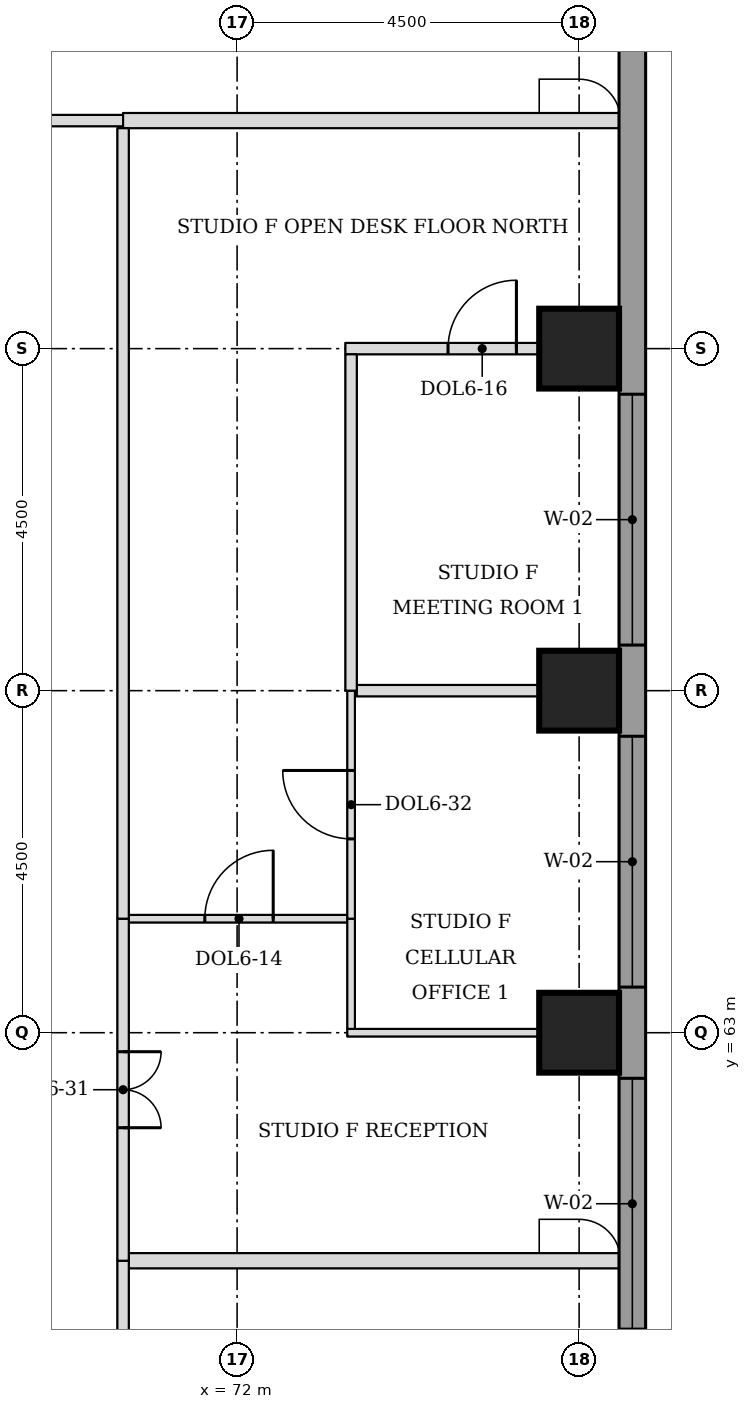
"""IFC4 building model, lengths in metres.
Left out: names, types, materials, properties, quantities, classifications, styles, units other than length and angle.
Written with IfcOpenShell. Run it as: python <this file> out.ifc"""

import sys

from ifc_helpers import new_model, si_unit, direction, frame, frame_2d, origin, origin_2d, place, context, subcontext, project, spatial, rectangle, extrude, element, fill, save


model = new_model("IFC4")
c1 = context("Model", 3, precision=1e-05, world=origin(), true_north=direction((0.0, 1.0)))
c2 = subcontext(c1, "Body", "Model", "MODEL_VIEW")
j1 = project(units=[si_unit("LENGTHUNIT", "METRE"), si_unit("PLANEANGLEUNIT", "RADIAN")], contexts=[c1])
p1 = place(None, origin())
s1 = spatial("IfcSite", under=j1, at=p1, CompositionType="ELEMENT")
p2 = place(p1, origin())
s2 = spatial("IfcBuilding", under=s1, at=p2, CompositionType="ELEMENT")
p3 = place(p2, frame((0.0, 0.0, 115.9)))
s3 = spatial("IfcBuildingStorey", under=s2, at=p3, CompositionType="ELEMENT", Elevation=115.9)
for number, where, z_axis, x_axis in (
    (1, (76.5, 63.0, 0.0), (0.0, 0.0, 1.0), (1.0, 0.0, 0.0)),
    (2, (76.5, 67.5, 0.0), (0.0, 0.0, 1.0), (1.0, 0.0, 0.0)),
    (3, (76.5, 72.0, 0.0), (0.0, 0.0, 1.0), (1.0, 0.0, 0.0)),
):
    element("IfcColumn", number, at=place(p3, frame(where, z_axis=z_axis, x_axis=x_axis)), inside=s3, PredefinedType="COLUMN", context=c2, shape_type="SweptSolid", body=[
        extrude(rectangle(XDim=1.05, YDim=1.05, at=origin_2d()), origin(), (0.0, 0.0, 1.0), 3.7),
    ])
p4 = place(p3, frame((77.2, 44.638, 0.0), z_axis=(0.0, 0.0, 1.0), x_axis=(0.0, 1.0, 0.0)))
e4 = element("IfcWall", 4, at=p4, inside=s3, PredefinedType="STANDARD", context=c2, shape_type="SweptSolid", body=[
    extrude(rectangle(XDim=32.225, YDim=0.35, at=frame_2d((16.112, 0.0))), origin(), (0.0, 0.0, 1.0), 3.525),
])
p5 = place(p4, frame((5.462, 0.0, 0.9)))
e5 = element("IfcOpeningElement", 5, at=p5, cuts=e4, PredefinedType="OPENING", context=c2, shape_type="SweptSolid", body=[
    extrude(rectangle(XDim=3.3, YDim=1.9, at=frame_2d((1.65, 0.95))), frame((0.0, 0.185, 0.0), z_axis=(0.0, -1.0, 0.0), x_axis=(1.0, 0.0, 0.0)), (0.0, 0.0, 1.0), 0.37),
])
p6 = place(p4, frame((9.962, 0.0, 0.9)))
e6 = element("IfcOpeningElement", 6, at=p6, cuts=e4, PredefinedType="OPENING", context=c2, shape_type="SweptSolid", body=[
    extrude(rectangle(XDim=3.3, YDim=1.9, at=frame_2d((1.65, 0.95))), frame((0.0, 0.185, 0.0), z_axis=(0.0, -1.0, 0.0), x_axis=(1.0, 0.0, 0.0)), (0.0, 0.0, 1.0), 0.37),
])
p7 = place(p4, frame((14.462, 0.0, 0.9)))
e7 = element("IfcOpeningElement", 7, at=p7, cuts=e4, PredefinedType="OPENING", context=c2, shape_type="SweptSolid", body=[
    extrude(rectangle(XDim=3.3, YDim=1.9, at=frame_2d((1.65, 0.95))), frame((0.0, 0.185, 0.0), z_axis=(0.0, -1.0, 0.0), x_axis=(1.0, 0.0, 0.0)), (0.0, 0.0, 1.0), 0.37),
])
p8 = place(p4, frame((18.962, 0.0, 0.9)))
e8 = element("IfcOpeningElement", 8, at=p8, cuts=e4, PredefinedType="OPENING", context=c2, shape_type="SweptSolid", body=[
    extrude(rectangle(XDim=3.3, YDim=1.9, at=frame_2d((1.65, 0.95))), frame((0.0, 0.185, 0.0), z_axis=(0.0, -1.0, 0.0), x_axis=(1.0, 0.0, 0.0)), (0.0, 0.0, 1.0), 0.37),
])
p9 = place(p4, frame((23.462, 0.0, 0.9)))
e9 = element("IfcOpeningElement", 9, at=p9, cuts=e4, PredefinedType="OPENING", context=c2, shape_type="SweptSolid", body=[
    extrude(rectangle(XDim=3.3, YDim=1.9, at=frame_2d((1.65, 0.95))), frame((0.0, 0.185, 0.0), z_axis=(0.0, -1.0, 0.0), x_axis=(1.0, 0.0, 0.0)), (0.0, 0.0, 1.0), 0.37),
])
p10 = place(p3, frame((70.575, 60.0, 0.0), z_axis=(0.0, 0.0, 1.0), x_axis=(1.0, 0.0, 0.0)))
e10 = element("IfcWall", 10, at=p10, inside=s3, PredefinedType="PARTITIONING", context=c2, shape_type="SweptSolid", body=[
    extrude(rectangle(XDim=6.45, YDim=0.2, at=frame_2d((3.225, 0.0))), origin(), (0.0, 0.0, 1.0), 3.55),
])
p11 = place(p3, frame((73.45, 63.0, 0.0), z_axis=(0.0, 0.0, 1.0), x_axis=(1.0, 0.0, 0.0)))
e11 = element("IfcWall", 11, at=p11, inside=s3, PredefinedType="PARTITIONING", context=c2, shape_type="SweptSolid", body=[
    extrude(rectangle(XDim=3.575, YDim=0.1, at=frame_2d((1.788, 0.0))), origin(), (0.0, 0.0, 1.0), 3.55),
])
p12 = place(p3, frame((70.575, 64.5, 0.0), z_axis=(0.0, 0.0, 1.0), x_axis=(1.0, 0.0, 0.0)))
e12 = element("IfcWall", 12, at=p12, inside=s3, PredefinedType="PARTITIONING", context=c2, shape_type="SweptSolid", body=[
    extrude(rectangle(XDim=2.875, YDim=0.1, at=frame_2d((1.438, 0.0))), origin(), (0.0, 0.0, 1.0), 3.55),
])
p13 = place(p12, frame((1.0, 0.0, 0.0)))
e13 = element("IfcOpeningElement", 13, at=p13, cuts=e12, PredefinedType="OPENING", context=c2, shape_type="SweptSolid", body=[
    extrude(rectangle(XDim=0.9, YDim=2.1, at=frame_2d((0.45, 1.05))), frame((0.0, 0.06, 0.0), z_axis=(0.0, -1.0, 0.0), x_axis=(1.0, 0.0, 0.0)), (0.0, 0.0, 1.0), 0.12),
])
p14 = place(p3, frame((73.575, 67.5, 0.0), z_axis=(0.0, 0.0, 1.0), x_axis=(1.0, 0.0, 0.0)))
e14 = element("IfcWall", 14, at=p14, inside=s3, PredefinedType="PARTITIONING", context=c2, shape_type="SweptSolid", body=[
    extrude(rectangle(XDim=3.45, YDim=0.15, at=frame_2d((1.725, 0.0))), origin(), (0.0, 0.0, 1.0), 3.55),
])
p15 = place(p3, frame((73.425, 72.0, 0.0), z_axis=(0.0, 0.0, 1.0), x_axis=(1.0, 0.0, 0.0)))
e15 = element("IfcWall", 15, at=p15, inside=s3, PredefinedType="PARTITIONING", context=c2, shape_type="SweptSolid", body=[
    extrude(rectangle(XDim=3.6, YDim=0.15, at=frame_2d((1.8, 0.0))), origin(), (0.0, 0.0, 1.0), 3.55),
])
p16 = place(p15, frame((1.35, 0.0, 0.0)))
e16 = element("IfcOpeningElement", 16, at=p16, cuts=e15, PredefinedType="OPENING", context=c2, shape_type="SweptSolid", body=[
    extrude(rectangle(XDim=0.9, YDim=2.1, at=frame_2d((0.45, 1.05))), frame((0.0, 0.085, 0.0), z_axis=(0.0, -1.0, 0.0), x_axis=(1.0, 0.0, 0.0)), (0.0, 0.0, 1.0), 0.17),
])
p17 = place(p3, frame((58.5, 75.0, 0.0), z_axis=(0.0, 0.0, 1.0), x_axis=(1.0, 0.0, 0.0)))
e17 = element("IfcWall", 17, at=p17, inside=s3, PredefinedType="PARTITIONING", context=c2, shape_type="SweptSolid", body=[
    extrude(rectangle(XDim=12.0, YDim=0.15, at=frame_2d((6.0, 0.0))), origin(), (0.0, 0.0, 1.0), 3.55),
])
p18 = place(p3, frame((70.5, 75.0, 0.0), z_axis=(0.0, 0.0, 1.0), x_axis=(1.0, 0.0, 0.0)))
e18 = element("IfcWall", 18, at=p18, inside=s3, PredefinedType="PARTITIONING", context=c2, shape_type="SweptSolid", body=[
    extrude(rectangle(XDim=6.525, YDim=0.2, at=frame_2d((3.262, 0.0))), origin(), (0.0, 0.0, 1.0), 3.55),
])
p19 = place(p3, frame((70.5, 46.6, 0.0), z_axis=(0.0, 0.0, 1.0), x_axis=(0.0, 1.0, 0.0)))
e19 = element("IfcWall", 19, at=p19, inside=s3, PredefinedType="PARTITIONING", context=c2, shape_type="SweptSolid", body=[
    extrude(rectangle(XDim=13.4, YDim=0.15, at=frame_2d((6.7, 0.0))), origin(), (0.0, 0.0, 1.0), 3.55),
])
p20 = place(p19, frame((6.2, 0.0, 0.0)))
e20 = element("IfcOpeningElement", 20, at=p20, cuts=e19, PredefinedType="OPENING", context=c2, shape_type="SweptSolid", body=[
    extrude(rectangle(XDim=1.0, YDim=2.1, at=frame_2d((0.5, 1.05))), frame((0.0, 0.085, 0.0), z_axis=(0.0, -1.0, 0.0), x_axis=(1.0, 0.0, 0.0)), (0.0, 0.0, 1.0), 0.17),
])
p21 = place(p3, frame((70.5, 60.0, 0.0), z_axis=(0.0, 0.0, 1.0), x_axis=(0.0, 1.0, 0.0)))
e21 = element("IfcWall", 21, at=p21, inside=s3, PredefinedType="PARTITIONING", context=c2, shape_type="SweptSolid", body=[
    extrude(rectangle(XDim=4.5, YDim=0.15, at=frame_2d((2.25, 0.0))), origin(), (0.0, 0.0, 1.0), 3.55),
])
p22 = place(p21, frame((1.75, 0.0, 0.0)))
e22 = element("IfcOpeningElement", 22, at=p22, cuts=e21, PredefinedType="OPENING", context=c2, shape_type="SweptSolid", body=[
    extrude(rectangle(XDim=1.0, YDim=2.1, at=frame_2d((0.5, 1.05))), frame((0.0, 0.085, 0.0), z_axis=(0.0, -1.0, 0.0), x_axis=(1.0, 0.0, 0.0)), (0.0, 0.0, 1.0), 0.17),
])
p23 = place(p3, frame((73.5, 63.05, 0.0), z_axis=(0.0, 0.0, 1.0), x_axis=(0.0, 1.0, 0.0)))
e23 = element("IfcWall", 23, at=p23, inside=s3, PredefinedType="PARTITIONING", context=c2, shape_type="SweptSolid", body=[
    extrude(rectangle(XDim=1.45, YDim=0.1, at=frame_2d((0.725, 0.0))), origin(), (0.0, 0.0, 1.0), 3.55),
])
p24 = place(p3, frame((70.5, 64.5, 0.0), z_axis=(0.0, 0.0, 1.0), x_axis=(0.0, 1.0, 0.0)))
e24 = element("IfcWall", 24, at=p24, inside=s3, PredefinedType="PARTITIONING", context=c2, shape_type="SweptSolid", body=[
    extrude(rectangle(XDim=10.4, YDim=0.15, at=frame_2d((5.2, 0.0))), origin(), (0.0, 0.0, 1.0), 3.55),
])
p25 = place(p3, frame((73.5, 64.5, 0.0), z_axis=(0.0, 0.0, 1.0), x_axis=(0.0, 1.0, 0.0)))
e25 = element("IfcWall", 25, at=p25, inside=s3, PredefinedType="PARTITIONING", context=c2, shape_type="SweptSolid", body=[
    extrude(rectangle(XDim=3.0, YDim=0.1, at=frame_2d((1.5, 0.0))), origin(), (0.0, 0.0, 1.0), 3.55),
])
p26 = place(p25, frame((1.05, 0.0, 0.0)))
e26 = element("IfcOpeningElement", 26, at=p26, cuts=e25, PredefinedType="OPENING", context=c2, shape_type="SweptSolid", body=[
    extrude(rectangle(XDim=0.9, YDim=2.1, at=frame_2d((0.45, 1.05))), frame((0.0, 0.06, 0.0), z_axis=(0.0, -1.0, 0.0), x_axis=(1.0, 0.0, 0.0)), (0.0, 0.0, 1.0), 0.12),
])
p27 = place(p3, frame((73.5, 67.5, 0.0), z_axis=(0.0, 0.0, 1.0), x_axis=(0.0, 1.0, 0.0)))
e27 = element("IfcWall", 27, at=p27, inside=s3, PredefinedType="PARTITIONING", context=c2, shape_type="SweptSolid", body=[
    extrude(rectangle(XDim=4.425, YDim=0.15, at=frame_2d((2.212, 0.0))), origin(), (0.0, 0.0, 1.0), 3.55),
])
p28 = place(p7, origin())
e28 = element("IfcWindow", 28, at=p28, inside=s3, PartitioningType="SINGLE_PANEL", PredefinedType="WINDOW", context=c2, shape_type="SweptSolid", body=[
    extrude(rectangle(XDim=3.3, YDim=1.9, at=frame_2d((1.65, 0.95))), frame((0.0, 0.085, 0.0), z_axis=(0.0, -1.0, 0.0), x_axis=(1.0, 0.0, 0.0)), (0.0, 0.0, 1.0), 0.06),
])
fill(e7, e28)
p29 = place(p8, origin())
e29 = element("IfcWindow", 29, at=p29, inside=s3, PartitioningType="SINGLE_PANEL", PredefinedType="WINDOW", context=c2, shape_type="SweptSolid", body=[
    extrude(rectangle(XDim=3.3, YDim=1.9, at=frame_2d((1.65, 0.95))), frame((0.0, 0.085, 0.0), z_axis=(0.0, -1.0, 0.0), x_axis=(1.0, 0.0, 0.0)), (0.0, 0.0, 1.0), 0.06),
])
fill(e8, e29)
p30 = place(p9, origin())
e30 = element("IfcWindow", 30, at=p30, inside=s3, PartitioningType="SINGLE_PANEL", PredefinedType="WINDOW", context=c2, shape_type="SweptSolid", body=[
    extrude(rectangle(XDim=3.3, YDim=1.9, at=frame_2d((1.65, 0.95))), frame((0.0, 0.085, 0.0), z_axis=(0.0, -1.0, 0.0), x_axis=(1.0, 0.0, 0.0)), (0.0, 0.0, 1.0), 0.06),
])
fill(e9, e30)
p31 = place(p22, frame((1.0, 0.0, 0.0), z_axis=(0.0, 0.0, 1.0), x_axis=(-1.0, 0.0, 0.0)))
e31 = element("IfcDoor", 31, at=p31, inside=s3, OperationType="DOUBLE_DOOR_SINGLE_SWING", PredefinedType="DOOR", context=c2, shape_type="SweptSolid", body=[
    extrude(rectangle(XDim=1.0, YDim=2.1, at=frame_2d((0.5, 1.05))), frame((0.0, 0.025, 0.0), z_axis=(0.0, -1.0, 0.0), x_axis=(1.0, 0.0, 0.0)), (0.0, 0.0, 1.0), 0.05),
])
fill(e22, e31)
p32 = place(p13, origin())
e32 = element("IfcDoor", 32, at=p32, inside=s3, OperationType="SINGLE_SWING_RIGHT", PredefinedType="DOOR", context=c2, shape_type="SweptSolid", body=[
    extrude(rectangle(XDim=0.9, YDim=2.1, at=frame_2d((0.45, 1.05))), frame((0.0, 0.025, 0.0), z_axis=(0.0, -1.0, 0.0), x_axis=(1.0, 0.0, 0.0)), (0.0, 0.0, 1.0), 0.05),
])
fill(e13, e32)
p33 = place(p26, origin())
e33 = element("IfcDoor", 33, at=p33, inside=s3, OperationType="SINGLE_SWING_RIGHT", PredefinedType="DOOR", context=c2, shape_type="SweptSolid", body=[
    extrude(rectangle(XDim=0.9, YDim=2.1, at=frame_2d((0.45, 1.05))), frame((0.0, 0.025, 0.0), z_axis=(0.0, -1.0, 0.0), x_axis=(1.0, 0.0, 0.0)), (0.0, 0.0, 1.0), 0.05),
])
fill(e26, e33)
p34 = place(p16, origin())
e34 = element("IfcDoor", 34, at=p34, inside=s3, OperationType="SINGLE_SWING_RIGHT", PredefinedType="DOOR", context=c2, shape_type="SweptSolid", body=[
    extrude(rectangle(XDim=0.9, YDim=2.1, at=frame_2d((0.45, 1.05))), frame((0.0, 0.025, 0.0), z_axis=(0.0, -1.0, 0.0), x_axis=(1.0, 0.0, 0.0)), (0.0, 0.0, 1.0), 0.05),
])
fill(e16, e34)
save(model, sys.argv[1])
